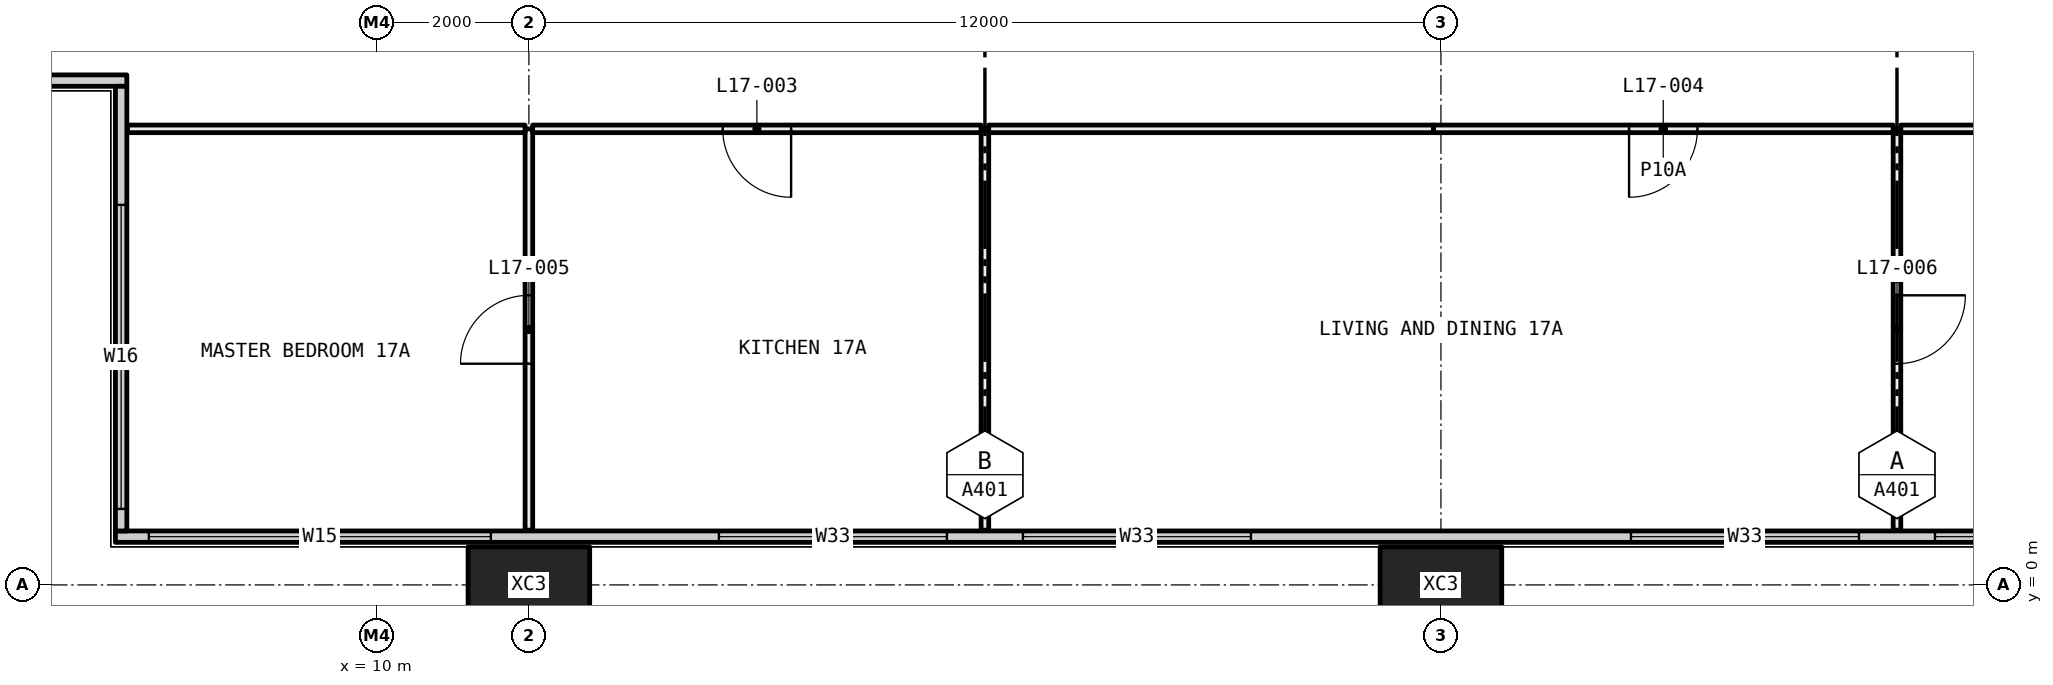
"""IFC4 building model, lengths in metres.
Left out: names, types, materials, properties, quantities, classifications, styles, units other than length and angle.
Written with IfcOpenShell. Run it as: python <this file> out.ifc"""

import sys

from ifc_helpers import new_model, si_unit, direction, frame, frame_2d, origin, origin_2d, place, context, subcontext, project, spatial, rectangle, hollow_rectangle, extrude, element, fill, save


model = new_model("IFC4")
c1 = context("Model", 3, precision=1e-05, world=origin(), true_north=direction((0.0, 1.0)))
c2 = subcontext(c1, "Body", "Model", "MODEL_VIEW")
j1 = project(units=[si_unit("LENGTHUNIT", "METRE"), si_unit("PLANEANGLEUNIT", "RADIAN")], contexts=[c1])
p1 = place(None, origin())
s1 = spatial("IfcSite", under=j1, at=p1, CompositionType="ELEMENT")
p2 = place(p1, origin())
s2 = spatial("IfcBuilding", under=s1, at=p2, CompositionType="ELEMENT")
p3 = place(p2, frame((0.0, 0.0, 71.4)))
s3 = spatial("IfcBuildingStorey", under=s2, at=p3, CompositionType="ELEMENT", Elevation=71.4)
for number, where, z_axis, x_axis in (
    (1, (12.0, 0.0, -0.4), (0.0, 0.0, 1.0), (1.0, 0.0, 0.0)),
    (2, (24.0, 0.0, -0.4), (0.0, 0.0, 1.0), (1.0, 0.0, 0.0)),
):
    element("IfcColumn", number, at=place(p3, frame(where, z_axis=z_axis, x_axis=x_axis)), inside=s3, PredefinedType="COLUMN", context=c2, shape_type="SweptSolid", body=[
        extrude(hollow_rectangle(XDim=1.6, YDim=1.0, WallThickness=0.065, at=origin_2d()), origin(), (0.0, 0.0, 1.0), 3.45),
    ])
p4 = place(p3, frame((6.56, 0.635, 0.0), z_axis=(0.0, 0.0, 1.0), x_axis=(1.0, 0.0, 0.0)))
e3 = element("IfcWall", 3, at=p4, inside=s3, PredefinedType="ELEMENTEDWALL", context=c2, shape_type="SweptSolid", body=[
    extrude(rectangle(XDim=58.88, YDim=0.15, at=frame_2d((29.44, 0.0))), origin(), (0.0, 0.0, 1.0), 3.05),
])
p5 = place(p4, frame((0.44, 0.0, 0.45)))
e4 = element("IfcOpeningElement", 4, at=p5, cuts=e3, PredefinedType="OPENING", context=c2, shape_type="SweptSolid", body=[
    extrude(rectangle(XDim=4.5, YDim=2.55, at=frame_2d((2.25, 1.275))), frame((0.0, 0.085, 0.0), z_axis=(0.0, -1.0, 0.0), x_axis=(1.0, 0.0, 0.0)), (0.0, 0.0, 1.0), 0.17),
])
p6 = place(p4, frame((7.94, 0.0, 0.45)))
e5 = element("IfcOpeningElement", 5, at=p6, cuts=e3, PredefinedType="OPENING", context=c2, shape_type="SweptSolid", body=[
    extrude(rectangle(XDim=3.0, YDim=2.55, at=frame_2d((1.5, 1.275))), frame((0.0, 0.085, 0.0), z_axis=(0.0, -1.0, 0.0), x_axis=(1.0, 0.0, 0.0)), (0.0, 0.0, 1.0), 0.17),
])
p7 = place(p4, frame((11.94, 0.0, 0.45)))
e6 = element("IfcOpeningElement", 6, at=p7, cuts=e3, PredefinedType="OPENING", context=c2, shape_type="SweptSolid", body=[
    extrude(rectangle(XDim=3.0, YDim=2.55, at=frame_2d((1.5, 1.275))), frame((0.0, 0.085, 0.0), z_axis=(0.0, -1.0, 0.0), x_axis=(1.0, 0.0, 0.0)), (0.0, 0.0, 1.0), 0.17),
])
p8 = place(p4, frame((19.94, 0.0, 0.45)))
e7 = element("IfcOpeningElement", 7, at=p8, cuts=e3, PredefinedType="OPENING", context=c2, shape_type="SweptSolid", body=[
    extrude(rectangle(XDim=3.0, YDim=2.55, at=frame_2d((1.5, 1.275))), frame((0.0, 0.085, 0.0), z_axis=(0.0, -1.0, 0.0), x_axis=(1.0, 0.0, 0.0)), (0.0, 0.0, 1.0), 0.17),
])
p9 = place(p4, frame((23.94, 0.0, 0.45)))
e8 = element("IfcOpeningElement", 8, at=p9, cuts=e3, PredefinedType="OPENING", context=c2, shape_type="SweptSolid", body=[
    extrude(rectangle(XDim=2.0, YDim=2.55, at=frame_2d((1.0, 1.275))), frame((0.0, 0.085, 0.0), z_axis=(0.0, -1.0, 0.0), x_axis=(1.0, 0.0, 0.0)), (0.0, 0.0, 1.0), 0.17),
])
p10 = place(p4, frame((31.94, 0.0, 0.45)))
e9 = element("IfcOpeningElement", 9, at=p10, cuts=e3, PredefinedType="OPENING", context=c2, shape_type="SweptSolid", body=[
    extrude(rectangle(XDim=3.0, YDim=2.55, at=frame_2d((1.5, 1.275))), frame((0.0, 0.085, 0.0), z_axis=(0.0, -1.0, 0.0), x_axis=(1.0, 0.0, 0.0)), (0.0, 0.0, 1.0), 0.17),
])
p11 = place(p4, frame((35.94, 0.0, 0.45)))
e10 = element("IfcOpeningElement", 10, at=p11, cuts=e3, PredefinedType="OPENING", context=c2, shape_type="SweptSolid", body=[
    extrude(rectangle(XDim=3.0, YDim=2.55, at=frame_2d((1.5, 1.275))), frame((0.0, 0.085, 0.0), z_axis=(0.0, -1.0, 0.0), x_axis=(1.0, 0.0, 0.0)), (0.0, 0.0, 1.0), 0.17),
])
p12 = place(p4, frame((43.94, 0.0, 0.45)))
e11 = element("IfcOpeningElement", 11, at=p12, cuts=e3, PredefinedType="OPENING", context=c2, shape_type="SweptSolid", body=[
    extrude(rectangle(XDim=3.0, YDim=2.55, at=frame_2d((1.5, 1.275))), frame((0.0, 0.085, 0.0), z_axis=(0.0, -1.0, 0.0), x_axis=(1.0, 0.0, 0.0)), (0.0, 0.0, 1.0), 0.17),
])
p13 = place(p4, frame((47.94, 0.0, 0.45)))
e12 = element("IfcOpeningElement", 12, at=p13, cuts=e3, PredefinedType="OPENING", context=c2, shape_type="SweptSolid", body=[
    extrude(rectangle(XDim=2.0, YDim=2.55, at=frame_2d((1.0, 1.275))), frame((0.0, 0.085, 0.0), z_axis=(0.0, -1.0, 0.0), x_axis=(1.0, 0.0, 0.0)), (0.0, 0.0, 1.0), 0.17),
])
p14 = place(p4, frame((53.94, 0.0, 0.45)))
e13 = element("IfcOpeningElement", 13, at=p14, cuts=e3, PredefinedType="OPENING", context=c2, shape_type="SweptSolid", body=[
    extrude(rectangle(XDim=4.5, YDim=2.55, at=frame_2d((2.25, 1.275))), frame((0.0, 0.085, 0.0), z_axis=(0.0, -1.0, 0.0), x_axis=(1.0, 0.0, 0.0)), (0.0, 0.0, 1.0), 0.17),
])
p15 = place(p3, frame((0.56, 6.635, 0.0), z_axis=(0.0, 0.0, 1.0), x_axis=(1.0, 0.0, 0.0)))
e14 = element("IfcWall", 14, at=p15, inside=s3, PredefinedType="ELEMENTEDWALL", context=c2, shape_type="SweptSolid", body=[
    extrude(rectangle(XDim=6.15, YDim=0.15, at=frame_2d((3.075, 0.0))), origin(), (0.0, 0.0, 1.0), 3.05),
])
p16 = place(p15, frame((0.44, 0.0, 0.45)))
e15 = element("IfcOpeningElement", 15, at=p16, cuts=e14, PredefinedType="OPENING", context=c2, shape_type="SweptSolid", body=[
    extrude(rectangle(XDim=4.0, YDim=2.55, at=frame_2d((2.0, 1.275))), frame((0.0, 0.085, 0.0), z_axis=(0.0, -1.0, 0.0), x_axis=(1.0, 0.0, 0.0)), (0.0, 0.0, 1.0), 0.17),
])
p17 = place(p3, frame((6.635, 0.71, 0.0), z_axis=(0.0, 0.0, 1.0), x_axis=(0.0, 1.0, 0.0)))
e16 = element("IfcWall", 16, at=p17, inside=s3, PredefinedType="ELEMENTEDWALL", context=c2, shape_type="SweptSolid", body=[
    extrude(rectangle(XDim=5.85, YDim=0.15, at=frame_2d((2.925, 0.0))), origin(), (0.0, 0.0, 1.0), 3.05),
])
p18 = place(p17, frame((0.29, 0.0, 0.45)))
e17 = element("IfcOpeningElement", 17, at=p18, cuts=e16, PredefinedType="OPENING", context=c2, shape_type="SweptSolid", body=[
    extrude(rectangle(XDim=4.0, YDim=2.55, at=frame_2d((2.0, 1.275))), frame((0.0, 0.085, 0.0), z_axis=(0.0, -1.0, 0.0), x_axis=(1.0, 0.0, 0.0)), (0.0, 0.0, 1.0), 0.17),
])
p19 = place(p3, frame((12.0, 0.72, 0.0), z_axis=(0.0, 0.0, 1.0), x_axis=(0.0, 1.0, 0.0)))
e18 = element("IfcWall", 18, at=p19, inside=s3, PredefinedType="PARTITIONING", context=c2, shape_type="SweptSolid", body=[
    extrude(rectangle(XDim=5.28, YDim=0.1, at=frame_2d((2.64, 0.0))), origin(), (0.0, 0.0, 1.0), 2.45),
])
p20 = place(p19, frame((2.19, 0.0, 0.0)))
e19 = element("IfcOpeningElement", 19, at=p20, cuts=e18, PredefinedType="OPENING", context=c2, shape_type="SweptSolid", body=[
    extrude(rectangle(XDim=0.9, YDim=2.1, at=frame_2d((0.45, 1.05))), frame((0.0, 0.06, 0.0), z_axis=(0.0, -1.0, 0.0), x_axis=(1.0, 0.0, 0.0)), (0.0, 0.0, 1.0), 0.12),
])
p21 = place(p3, frame((11.95, 6.0, 0.0), z_axis=(0.0, 0.0, 1.0), x_axis=(-1.0, 0.0, 0.0)))
e20 = element("IfcWall", 20, at=p21, inside=s3, PredefinedType="PARTITIONING", context=c2, shape_type="SweptSolid", body=[
    extrude(rectangle(XDim=5.23, YDim=0.1, at=frame_2d((2.615, 0.0))), origin(), (0.0, 0.0, 1.0), 2.45),
])
p22 = place(p3, frame((18.0, 0.72, 0.0), z_axis=(0.0, 0.0, 1.0), x_axis=(0.0, 1.0, 0.0)))
e21 = element("IfcWall", 21, at=p22, inside=s3, PredefinedType="PARTITIONING", context=c2, shape_type="SweptSolid", body=[
    extrude(rectangle(XDim=5.28, YDim=0.1, at=frame_2d((2.64, 0.0))), origin(), (0.0, 0.0, 1.0), 3.05),
])
p23 = place(p3, frame((17.95, 6.0, 0.0), z_axis=(0.0, 0.0, 1.0), x_axis=(-1.0, 0.0, 0.0)))
e22 = element("IfcWall", 22, at=p23, inside=s3, PredefinedType="PARTITIONING", context=c2, shape_type="SweptSolid", body=[
    extrude(rectangle(XDim=5.9, YDim=0.1, at=frame_2d((2.95, 0.0))), origin(), (0.0, 0.0, 1.0), 2.45),
])
p24 = place(p23, frame((2.5, 0.0, 0.0)))
e23 = element("IfcOpeningElement", 23, at=p24, cuts=e22, PredefinedType="OPENING", context=c2, shape_type="SweptSolid", body=[
    extrude(rectangle(XDim=0.9, YDim=2.1, at=frame_2d((0.45, 1.05))), frame((0.0, 0.06, 0.0), z_axis=(0.0, -1.0, 0.0), x_axis=(1.0, 0.0, 0.0)), (0.0, 0.0, 1.0), 0.12),
])
p25 = place(p3, frame((30.0, 0.72, 0.0), z_axis=(0.0, 0.0, 1.0), x_axis=(0.0, 1.0, 0.0)))
e24 = element("IfcWall", 24, at=p25, inside=s3, PredefinedType="PARTITIONING", context=c2, shape_type="SweptSolid", body=[
    extrude(rectangle(XDim=5.28, YDim=0.1, at=frame_2d((2.64, 0.0))), origin(), (0.0, 0.0, 1.0), 3.05),
])
p26 = place(p25, frame((2.19, 0.0, 0.0)))
e25 = element("IfcOpeningElement", 25, at=p26, cuts=e24, PredefinedType="OPENING", context=c2, shape_type="SweptSolid", body=[
    extrude(rectangle(XDim=0.9, YDim=2.1, at=frame_2d((0.45, 1.05))), frame((0.0, 0.06, 0.0), z_axis=(0.0, -1.0, 0.0), x_axis=(1.0, 0.0, 0.0)), (0.0, 0.0, 1.0), 0.12),
])
p27 = place(p3, frame((29.95, 6.0, 0.0), z_axis=(0.0, 0.0, 1.0), x_axis=(-1.0, 0.0, 0.0)))
e26 = element("IfcWall", 26, at=p27, inside=s3, PredefinedType="PARTITIONING", context=c2, shape_type="SweptSolid", body=[
    extrude(rectangle(XDim=6.05, YDim=0.1, at=frame_2d((3.025, 0.0))), origin(), (0.0, 0.0, 1.0), 2.45),
])
p28 = place(p27, frame((2.575, 0.0, 0.0)))
e27 = element("IfcOpeningElement", 27, at=p28, cuts=e26, PredefinedType="OPENING", context=c2, shape_type="SweptSolid", body=[
    extrude(rectangle(XDim=0.9, YDim=2.1, at=frame_2d((0.45, 1.05))), frame((0.0, 0.06, 0.0), z_axis=(0.0, -1.0, 0.0), x_axis=(1.0, 0.0, 0.0)), (0.0, 0.0, 1.0), 0.12),
])
p29 = place(p3, frame((23.9, 6.0, 0.0), z_axis=(0.0, 0.0, 1.0), x_axis=(-1.0, 0.0, 0.0)))
e28 = element("IfcWall", 28, at=p29, inside=s3, PredefinedType="PARTITIONING", context=c2, shape_type="SweptSolid", body=[
    extrude(rectangle(XDim=5.85, YDim=0.1, at=frame_2d((2.925, 0.0))), origin(), (0.0, 0.0, 1.0), 3.05),
])
p30 = place(p3, frame((32.925, 6.0, 0.0), z_axis=(0.0, 0.0, 1.0), x_axis=(-1.0, 0.0, 0.0)))
e29 = element("IfcWall", 29, at=p30, inside=s3, PredefinedType="PARTITIONING", context=c2, shape_type="SweptSolid", body=[
    extrude(rectangle(XDim=2.875, YDim=0.1, at=frame_2d((1.438, 0.0))), origin(), (0.0, 0.0, 1.0), 3.05),
])
p31 = place(p5, origin())
e30 = element("IfcWindow", 30, at=p31, inside=s3, PartitioningType="SINGLE_PANEL", PredefinedType="WINDOW", context=c2, shape_type="SweptSolid", body=[
    extrude(rectangle(XDim=4.5, YDim=2.55, at=frame_2d((2.25, 1.275))), frame((0.0, 0.03, 0.0), z_axis=(0.0, -1.0, 0.0), x_axis=(1.0, 0.0, 0.0)), (0.0, 0.0, 1.0), 0.06),
])
fill(e4, e30)
p32 = place(p6, origin())
e31 = element("IfcWindow", 31, at=p32, inside=s3, PartitioningType="SINGLE_PANEL", PredefinedType="WINDOW", context=c2, shape_type="SweptSolid", body=[
    extrude(rectangle(XDim=3.0, YDim=2.55, at=frame_2d((1.5, 1.275))), frame((0.0, 0.03, 0.0), z_axis=(0.0, -1.0, 0.0), x_axis=(1.0, 0.0, 0.0)), (0.0, 0.0, 1.0), 0.06),
])
fill(e5, e31)
p33 = place(p7, origin())
e32 = element("IfcWindow", 32, at=p33, inside=s3, PartitioningType="SINGLE_PANEL", PredefinedType="WINDOW", context=c2, shape_type="SweptSolid", body=[
    extrude(rectangle(XDim=3.0, YDim=2.55, at=frame_2d((1.5, 1.275))), frame((0.0, 0.03, 0.0), z_axis=(0.0, -1.0, 0.0), x_axis=(1.0, 0.0, 0.0)), (0.0, 0.0, 1.0), 0.06),
])
fill(e6, e32)
p34 = place(p8, origin())
e33 = element("IfcWindow", 33, at=p34, inside=s3, PartitioningType="SINGLE_PANEL", PredefinedType="WINDOW", context=c2, shape_type="SweptSolid", body=[
    extrude(rectangle(XDim=3.0, YDim=2.55, at=frame_2d((1.5, 1.275))), frame((0.0, 0.03, 0.0), z_axis=(0.0, -1.0, 0.0), x_axis=(1.0, 0.0, 0.0)), (0.0, 0.0, 1.0), 0.06),
])
fill(e7, e33)
p35 = place(p9, origin())
e34 = element("IfcWindow", 34, at=p35, inside=s3, PartitioningType="SINGLE_PANEL", PredefinedType="WINDOW", context=c2, shape_type="SweptSolid", body=[
    extrude(rectangle(XDim=2.0, YDim=2.55, at=frame_2d((1.0, 1.275))), frame((0.0, 0.03, 0.0), z_axis=(0.0, -1.0, 0.0), x_axis=(1.0, 0.0, 0.0)), (0.0, 0.0, 1.0), 0.06),
])
fill(e8, e34)
p36 = place(p18, origin())
e35 = element("IfcWindow", 35, at=p36, inside=s3, PartitioningType="SINGLE_PANEL", PredefinedType="WINDOW", context=c2, shape_type="SweptSolid", body=[
    extrude(rectangle(XDim=4.0, YDim=2.55, at=frame_2d((2.0, 1.275))), frame((0.0, 0.03, 0.0), z_axis=(0.0, -1.0, 0.0), x_axis=(1.0, 0.0, 0.0)), (0.0, 0.0, 1.0), 0.06),
])
fill(e17, e35)
p37 = place(p24, origin())
e36 = element("IfcDoor", 36, at=p37, inside=s3, OperationType="SINGLE_SWING_RIGHT", PredefinedType="DOOR", context=c2, shape_type="SweptSolid", body=[
    extrude(rectangle(XDim=0.9, YDim=2.1, at=frame_2d((0.45, 1.05))), frame((0.0, 0.025, 0.0), z_axis=(0.0, -1.0, 0.0), x_axis=(1.0, 0.0, 0.0)), (0.0, 0.0, 1.0), 0.05),
])
fill(e23, e36)
p38 = place(p28, origin())
e37 = element("IfcDoor", 37, at=p38, inside=s3, OperationType="SINGLE_SWING_LEFT", PredefinedType="DOOR", context=c2, shape_type="SweptSolid", body=[
    extrude(rectangle(XDim=0.9, YDim=2.1, at=frame_2d((0.45, 1.05))), frame((0.0, 0.025, 0.0), z_axis=(0.0, -1.0, 0.0), x_axis=(1.0, 0.0, 0.0)), (0.0, 0.0, 1.0), 0.05),
])
fill(e27, e37)
p39 = place(p20, origin())
e38 = element("IfcDoor", 38, at=p39, inside=s3, OperationType="SINGLE_SWING_RIGHT", PredefinedType="DOOR", context=c2, shape_type="SweptSolid", body=[
    extrude(rectangle(XDim=0.9, YDim=2.1, at=frame_2d((0.45, 1.05))), frame((0.0, 0.025, 0.0), z_axis=(0.0, -1.0, 0.0), x_axis=(1.0, 0.0, 0.0)), (0.0, 0.0, 1.0), 0.05),
])
fill(e19, e38)
p40 = place(p26, frame((0.9, 0.0, 0.0), x_axis=(-1.0, 0.0, 0.0)))
e39 = element("IfcDoor", 39, at=p40, inside=s3, OperationType="SINGLE_SWING_RIGHT", PredefinedType="DOOR", context=c2, shape_type="SweptSolid", body=[
    extrude(rectangle(XDim=0.9, YDim=2.1, at=frame_2d((0.45, 1.05))), frame((0.0, 0.025, 0.0), z_axis=(0.0, -1.0, 0.0), x_axis=(1.0, 0.0, 0.0)), (0.0, 0.0, 1.0), 0.05),
])
fill(e25, e39)
save(model, sys.argv[1])
